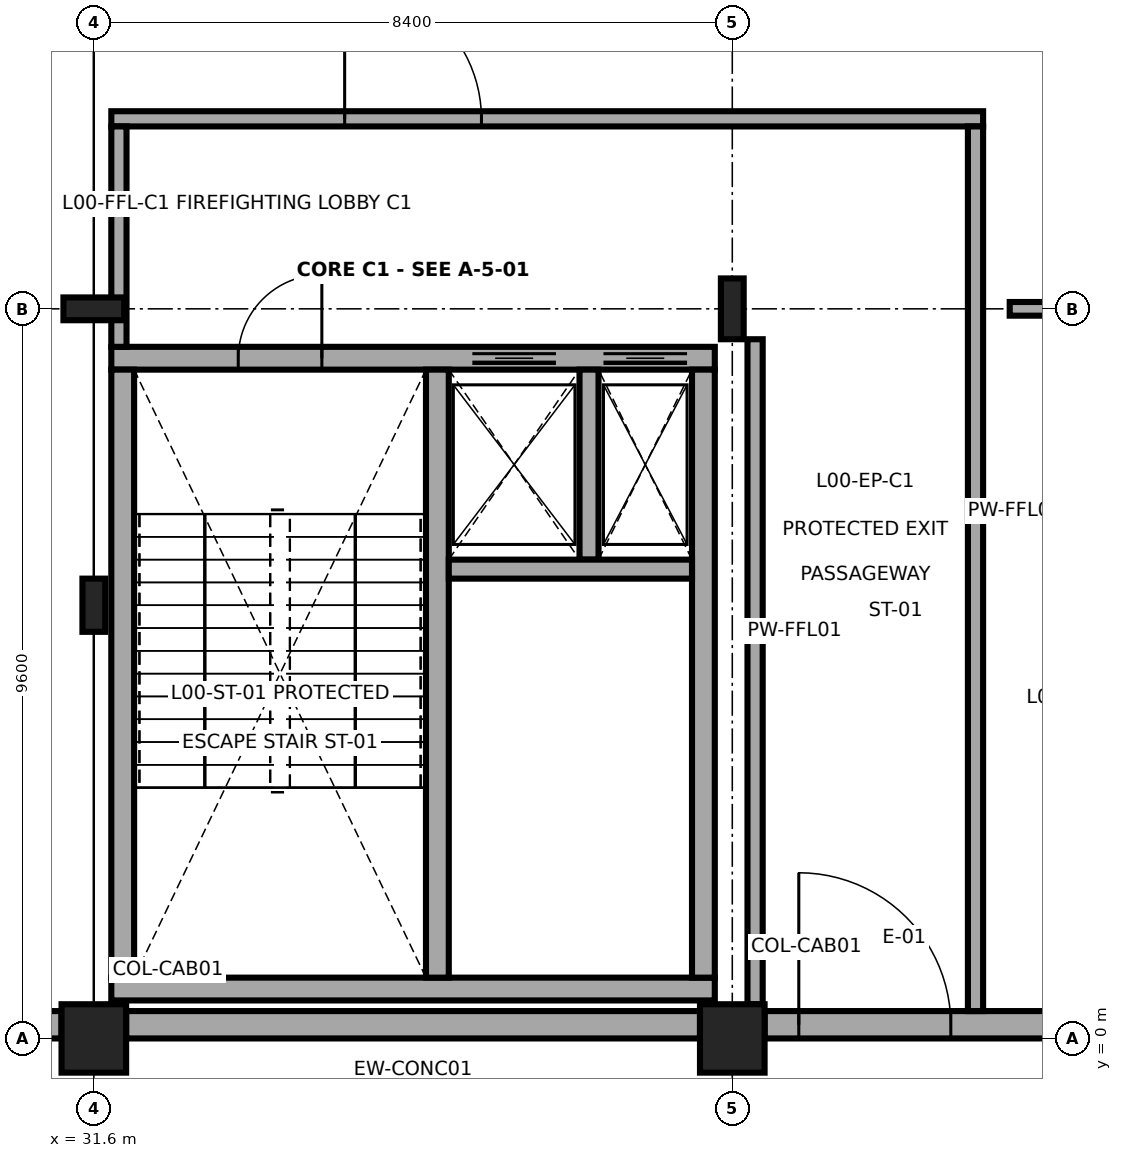
"""IFC4 building model, lengths in metres.
Left out: names, types, materials, properties, quantities, classifications, styles, units other than length and angle.
Written with IfcOpenShell. Run it as: python <this file> out.ifc"""

import sys

from ifc_helpers import new_model, si_unit, direction, frame, frame_2d, origin, origin_2d, place, context, subcontext, project, spatial, rectangle, i_section, extrude, element, fill, save


model = new_model("IFC4")
c1 = context("Model", 3, precision=1e-05, world=origin(), true_north=direction((0.0, 1.0)))
c2 = subcontext(c1, "Body", "Model", "MODEL_VIEW")
j1 = project(units=[si_unit("LENGTHUNIT", "METRE"), si_unit("PLANEANGLEUNIT", "RADIAN")], contexts=[c1])
p1 = place(None, origin())
s1 = spatial("IfcSite", under=j1, at=p1, CompositionType="ELEMENT")
p2 = place(p1, origin())
s2 = spatial("IfcBuilding", under=s1, at=p2, CompositionType="ELEMENT")
p3 = place(p2, origin())
s3 = spatial("IfcBuildingStorey", under=s2, at=p3, CompositionType="ELEMENT", Elevation=0.0)
p4 = place(p3, frame((31.6, 0.0, 0.0), z_axis=(0.0, 0.0, 1.0), x_axis=(1.0, 0.0, 0.0)))
e1 = element("IfcColumn", 1, at=p4, inside=s3, PredefinedType="COLUMN", context=c2, shape_type="SweptSolid", body=[
    extrude(rectangle(XDim=0.85, YDim=0.9, at=origin_2d()), origin(), (0.0, 0.0, 1.0), 8.4),
])
p5 = place(p3, frame((31.6, 9.6, 0.0), z_axis=(0.0, 0.0, 1.0), x_axis=(0.0, 1.0, 0.0)))
e2 = element("IfcColumn", 2, at=p5, inside=s3, PredefinedType="COLUMN", context=c2, shape_type="SweptSolid", body=[
    extrude(i_section(OverallWidth=0.3, OverallDepth=0.8, WebThickness=0.018, FlangeThickness=0.033, FilletRadius=0.03, at=origin_2d()), origin(), (0.0, 0.0, 1.0), 8.4),
])
p6 = place(p3, frame((40.0, 0.0, 0.0), z_axis=(0.0, 0.0, 1.0), x_axis=(1.0, 0.0, 0.0)))
e3 = element("IfcColumn", 3, at=p6, inside=s3, PredefinedType="COLUMN", context=c2, shape_type="SweptSolid", body=[
    extrude(rectangle(XDim=0.85, YDim=0.9, at=origin_2d()), origin(), (0.0, 0.0, 1.0), 8.4),
])
p7 = place(p3, frame((40.0, 9.6, 0.0), z_axis=(0.0, 0.0, 1.0), x_axis=(1.0, 0.0, 0.0)))
e4 = element("IfcColumn", 4, at=p7, inside=s3, PredefinedType="COLUMN", context=c2, shape_type="SweptSolid", body=[
    extrude(i_section(OverallWidth=0.3, OverallDepth=0.8, WebThickness=0.018, FlangeThickness=0.033, FilletRadius=0.03, at=origin_2d()), origin(), (0.0, 0.0, 1.0), 8.4),
])
p8 = place(p3, frame((31.6, 5.7, 0.0), z_axis=(0.0, 0.0, 1.0), x_axis=(1.0, 0.0, 0.0)))
e5 = element("IfcColumn", 5, at=p8, inside=s3, PredefinedType="COLUMN", context=c2, shape_type="SweptSolid", body=[
    extrude(i_section(OverallWidth=0.3, OverallDepth=0.7, WebThickness=0.017, FlangeThickness=0.032, FilletRadius=0.027, at=origin_2d()), origin(), (0.0, 0.0, 1.0), 8.4),
])
p9 = place(p3, frame((32.025, 0.18, 0.0), z_axis=(0.0, 0.0, 1.0), x_axis=(1.0, 0.0, 0.0)))
e6 = element("IfcWall", 6, at=p9, inside=s3, PredefinedType="SOLIDWALL", context=c2, shape_type="SweptSolid", body=[
    extrude(rectangle(XDim=7.55, YDim=0.36, at=frame_2d((3.775, 0.0))), origin(), (0.0, 0.0, 1.0), 7.235),
])
p10 = place(p3, frame((40.425, 0.18, 0.0), z_axis=(0.0, 0.0, 1.0), x_axis=(1.0, 0.0, 0.0)))
e7 = element("IfcWall", 7, at=p10, inside=s3, PredefinedType="SOLIDWALL", context=c2, shape_type="SweptSolid", body=[
    extrude(rectangle(XDim=7.55, YDim=0.36, at=frame_2d((3.775, 0.0))), origin(), (0.0, 0.0, 1.0), 7.235),
])
p11 = place(p10, frame((0.45, 0.0, 0.0)))
e8 = element("IfcOpeningElement", 8, at=p11, cuts=e7, PredefinedType="OPENING", context=c2, shape_type="SweptSolid", body=[
    extrude(rectangle(XDim=2.0, YDim=2.4, at=frame_2d((1.0, 1.2))), frame((0.0, 0.19, 0.0), z_axis=(0.0, -1.0, 0.0), x_axis=(1.0, 0.0, 0.0)), (0.0, 0.0, 1.0), 0.38),
])
p12 = place(p3, frame((23.35, 0.18, 0.0), z_axis=(0.0, 0.0, 1.0), x_axis=(1.0, 0.0, 0.0)))
e9 = element("IfcWall", 9, at=p12, inside=s3, PredefinedType="SOLIDWALL", context=c2, shape_type="SweptSolid", body=[
    extrude(rectangle(XDim=7.825, YDim=0.36, at=frame_2d((3.913, 0.0))), origin(), (0.0, 0.0, 1.0), 7.45),
])
p13 = place(p12, frame((2.55, 0.0, 0.0)))
e10 = element("IfcOpeningElement", 10, at=p13, cuts=e9, PredefinedType="OPENING", context=c2, shape_type="SweptSolid", body=[
    extrude(rectangle(XDim=2.4, YDim=2.6, at=frame_2d((1.2, 1.3))), frame((0.0, 0.19, 0.0), z_axis=(0.0, -1.0, 0.0), x_axis=(1.0, 0.0, 0.0)), (0.0, 0.0, 1.0), 0.38),
])
p14 = place(p12, frame((2.65, 0.0, 2.9)))
e11 = element("IfcOpeningElement", 11, at=p14, cuts=e9, PredefinedType="OPENING", context=c2, shape_type="SweptSolid", body=[
    extrude(rectangle(XDim=2.2, YDim=4.2, at=frame_2d((1.1, 2.1))), frame((0.0, 0.19, 0.0), z_axis=(0.0, -1.0, 0.0), x_axis=(1.0, 0.0, 0.0)), (0.0, 0.0, 1.0), 0.38),
])
p15 = place(p3, frame((31.83, 0.65, 0.0), z_axis=(0.0, 0.0, 1.0), x_axis=(1.0, 0.0, 0.0)))
e12 = element("IfcWall", 12, at=p15, inside=s3, PredefinedType="SHEAR", context=c2, shape_type="SweptSolid", body=[
    extrude(rectangle(XDim=7.94, YDim=0.3, at=frame_2d((3.97, 0.0))), origin(), (0.0, 0.0, 1.0), 8.15),
])
p16 = place(p3, frame((39.77, 8.95, 0.0), z_axis=(0.0, 0.0, 1.0), x_axis=(-1.0, 0.0, 0.0)))
e13 = element("IfcWall", 13, at=p16, inside=s3, PredefinedType="SHEAR", context=c2, shape_type="SweptSolid", body=[
    extrude(rectangle(XDim=7.94, YDim=0.3, at=frame_2d((3.97, 0.0))), origin(), (0.0, 0.0, 1.0), 8.15),
])
p17 = place(p16, frame((5.17, 0.0, 0.0)))
e14 = element("IfcOpeningElement", 14, at=p17, cuts=e13, PredefinedType="OPENING", context=c2, shape_type="SweptSolid", body=[
    extrude(rectangle(XDim=1.1, YDim=2.2, at=frame_2d((0.55, 1.1))), frame((0.0, 0.16, 0.0), z_axis=(0.0, -1.0, 0.0), x_axis=(1.0, 0.0, 0.0)), (0.0, 0.0, 1.0), 0.32),
])
p18 = place(p16, frame((2.09, 0.0, 0.0)))
e15 = element("IfcOpeningElement", 15, at=p18, cuts=e13, PredefinedType="OPENING", context=c2, shape_type="SweptSolid", body=[
    extrude(rectangle(XDim=1.1, YDim=2.1, at=frame_2d((0.55, 1.05))), frame((0.0, 0.16, 0.0), z_axis=(0.0, -1.0, 0.0), x_axis=(1.0, 0.0, 0.0)), (0.0, 0.0, 1.0), 0.32),
])
p19 = place(p16, frame((0.365, 0.0, 0.0)))
e16 = element("IfcOpeningElement", 16, at=p19, cuts=e13, PredefinedType="OPENING", context=c2, shape_type="SweptSolid", body=[
    extrude(rectangle(XDim=1.1, YDim=2.1, at=frame_2d((0.55, 1.05))), frame((0.0, 0.16, 0.0), z_axis=(0.0, -1.0, 0.0), x_axis=(1.0, 0.0, 0.0)), (0.0, 0.0, 1.0), 0.32),
])
for number, where, z_axis, x_axis in (
    (17, (31.98, 8.8, 0.0), (0.0, 0.0, 1.0), (0.0, -1.0, 0.0)),
    (18, (39.62, 0.8, 0.0), (0.0, 0.0, 1.0), (0.0, 1.0, 0.0)),
    (19, (36.12, 0.8, 0.0), (0.0, 0.0, 1.0), (0.0, 1.0, 0.0)),
):
    element("IfcWall", number, at=place(p3, frame(where, z_axis=z_axis, x_axis=x_axis)), inside=s3, PredefinedType="SHEAR", context=c2, shape_type="SweptSolid", body=[
        extrude(rectangle(XDim=8.0, YDim=0.3, at=frame_2d((4.0, 0.0))), origin(), (0.0, 0.0, 1.0), 8.15),
    ])
p20 = place(p3, frame((38.115, 6.3, 0.0), z_axis=(0.0, 0.0, 1.0), x_axis=(0.0, 1.0, 0.0)))
e20 = element("IfcWall", 20, at=p20, inside=s3, PredefinedType="SHEAR", context=c2, shape_type="SweptSolid", body=[
    extrude(rectangle(XDim=2.5, YDim=0.25, at=frame_2d((1.25, 0.0))), origin(), (0.0, 0.0, 1.0), 8.15),
])
p21 = place(p3, frame((36.27, 6.175, 0.0), z_axis=(0.0, 0.0, 1.0), x_axis=(1.0, 0.0, 0.0)))
e21 = element("IfcWall", 21, at=p21, inside=s3, PredefinedType="SHEAR", context=c2, shape_type="SweptSolid", body=[
    extrude(rectangle(XDim=3.2, YDim=0.25, at=frame_2d((1.6, 0.0))), origin(), (0.0, 0.0, 1.0), 8.15),
])
p22 = place(p3, frame((31.83, 12.1, 0.0), z_axis=(0.0, 0.0, 1.0), x_axis=(1.0, 0.0, 0.0)))
e22 = element("IfcWall", 22, at=p22, inside=s3, PredefinedType="SOLIDWALL", context=c2, shape_type="SweptSolid", body=[
    extrude(rectangle(XDim=11.47, YDim=0.2, at=frame_2d((5.735, 0.0))), origin(), (0.0, 0.0, 1.0), 7.532),
])
p23 = place(p22, frame((3.07, 0.0, 0.0)))
e23 = element("IfcOpeningElement", 23, at=p23, cuts=e22, PredefinedType="OPENING", context=c2, shape_type="SweptSolid", body=[
    extrude(rectangle(XDim=1.8, YDim=2.2, at=frame_2d((0.9, 1.1))), frame((0.0, 0.11, 0.0), z_axis=(0.0, -1.0, 0.0), x_axis=(1.0, 0.0, 0.0)), (0.0, 0.0, 1.0), 0.22),
])
p24 = place(p3, frame((31.93, 9.1, 0.0), z_axis=(0.0, 0.0, 1.0), x_axis=(0.0, 1.0, 0.0)))
e24 = element("IfcWall", 24, at=p24, inside=s3, PredefinedType="SOLIDWALL", context=c2, shape_type="SweptSolid", body=[
    extrude(rectangle(XDim=2.9, YDim=0.2, at=frame_2d((1.45, 0.0))), origin(), (0.0, 0.0, 1.0), 7.582),
])
p25 = place(p3, frame((43.2, 12.0, 0.0), z_axis=(0.0, 0.0, 1.0), x_axis=(0.0, -1.0, 0.0)))
e25 = element("IfcWall", 25, at=p25, inside=s3, PredefinedType="SOLIDWALL", context=c2, shape_type="SweptSolid", body=[
    extrude(rectangle(XDim=11.64, YDim=0.2, at=frame_2d((5.82, 0.0))), origin(), (0.0, 0.0, 1.0), 7.232),
])
p26 = place(p3, frame((40.3, 0.45, 0.0), z_axis=(0.0, 0.0, 1.0), x_axis=(0.0, 1.0, 0.0)))
e26 = element("IfcWall", 26, at=p26, inside=s3, PredefinedType="SOLIDWALL", context=c2, shape_type="SweptSolid", body=[
    extrude(rectangle(XDim=8.75, YDim=0.2, at=frame_2d((4.375, 0.0))), origin(), (0.0, 0.0, 1.0), 8.135),
])
p27 = place(p3, frame((43.65, 9.6, 0.0), z_axis=(0.0, 0.0, 1.0), x_axis=(1.0, 0.0, 0.0)))
e27 = element("IfcWall", 27, at=p27, inside=s3, PredefinedType="PARTITIONING", context=c2, shape_type="SweptSolid", body=[
    extrude(rectangle(XDim=4.2, YDim=0.18, at=frame_2d((2.1, 0.0))), origin(), (0.0, 0.0, 1.0), 7.582),
])
p28 = place(p27, frame((1.35, 0.0, 0.0)))
e28 = element("IfcOpeningElement", 28, at=p28, cuts=e27, PredefinedType="OPENING", context=c2, shape_type="SweptSolid", body=[
    extrude(rectangle(XDim=1.5, YDim=2.3, at=frame_2d((0.75, 1.15))), frame((0.0, 0.1, 0.0), z_axis=(0.0, -1.0, 0.0), x_axis=(1.0, 0.0, 0.0)), (0.0, 0.0, 1.0), 0.2),
])
p29 = place(p11, frame((2.0, 0.0, 0.0), z_axis=(0.0, 0.0, 1.0), x_axis=(-1.0, 0.0, 0.0)))
e29 = element("IfcDoor", 29, at=p29, inside=s3, OperationType="DOUBLE_DOOR_SINGLE_SWING", PredefinedType="DOOR", context=c2, shape_type="SweptSolid", body=[
    extrude(rectangle(XDim=2.0, YDim=2.4, at=frame_2d((1.0, 1.2))), frame((0.0, 0.025, 0.0), z_axis=(0.0, -1.0, 0.0), x_axis=(1.0, 0.0, 0.0)), (0.0, 0.0, 1.0), 0.05),
])
fill(e8, e29)
p30 = place(p17, origin())
e30 = element("IfcDoor", 30, at=p30, inside=s3, OperationType="SINGLE_SWING_RIGHT", PredefinedType="DOOR", context=c2, shape_type="SweptSolid", body=[
    extrude(rectangle(XDim=1.1, YDim=2.2, at=frame_2d((0.55, 1.1))), frame((0.0, 0.025, 0.0), z_axis=(0.0, -1.0, 0.0), x_axis=(1.0, 0.0, 0.0)), (0.0, 0.0, 1.0), 0.05),
])
fill(e14, e30)
p31 = place(p18, origin())
e31 = element("IfcDoor", 31, at=p31, inside=s3, OperationType="SLIDING_TO_LEFT", PredefinedType="DOOR", context=c2, shape_type="SweptSolid", body=[
    extrude(rectangle(XDim=1.1, YDim=2.1, at=frame_2d((0.55, 1.05))), frame((0.0, 0.025, 0.0), z_axis=(0.0, -1.0, 0.0), x_axis=(1.0, 0.0, 0.0)), (0.0, 0.0, 1.0), 0.05),
])
fill(e15, e31)
p32 = place(p19, origin())
e32 = element("IfcDoor", 32, at=p32, inside=s3, OperationType="SLIDING_TO_LEFT", PredefinedType="DOOR", context=c2, shape_type="SweptSolid", body=[
    extrude(rectangle(XDim=1.1, YDim=2.1, at=frame_2d((0.55, 1.05))), frame((0.0, 0.025, 0.0), z_axis=(0.0, -1.0, 0.0), x_axis=(1.0, 0.0, 0.0)), (0.0, 0.0, 1.0), 0.05),
])
fill(e16, e32)
p33 = place(p23, origin())
e33 = element("IfcDoor", 33, at=p33, inside=s3, OperationType="DOUBLE_DOOR_SINGLE_SWING", PredefinedType="DOOR", context=c2, shape_type="SweptSolid", body=[
    extrude(rectangle(XDim=1.8, YDim=2.2, at=frame_2d((0.9, 1.1))), frame((0.0, 0.025, 0.0), z_axis=(0.0, -1.0, 0.0), x_axis=(1.0, 0.0, 0.0)), (0.0, 0.0, 1.0), 0.05),
])
fill(e23, e33)
save(model, sys.argv[1])
